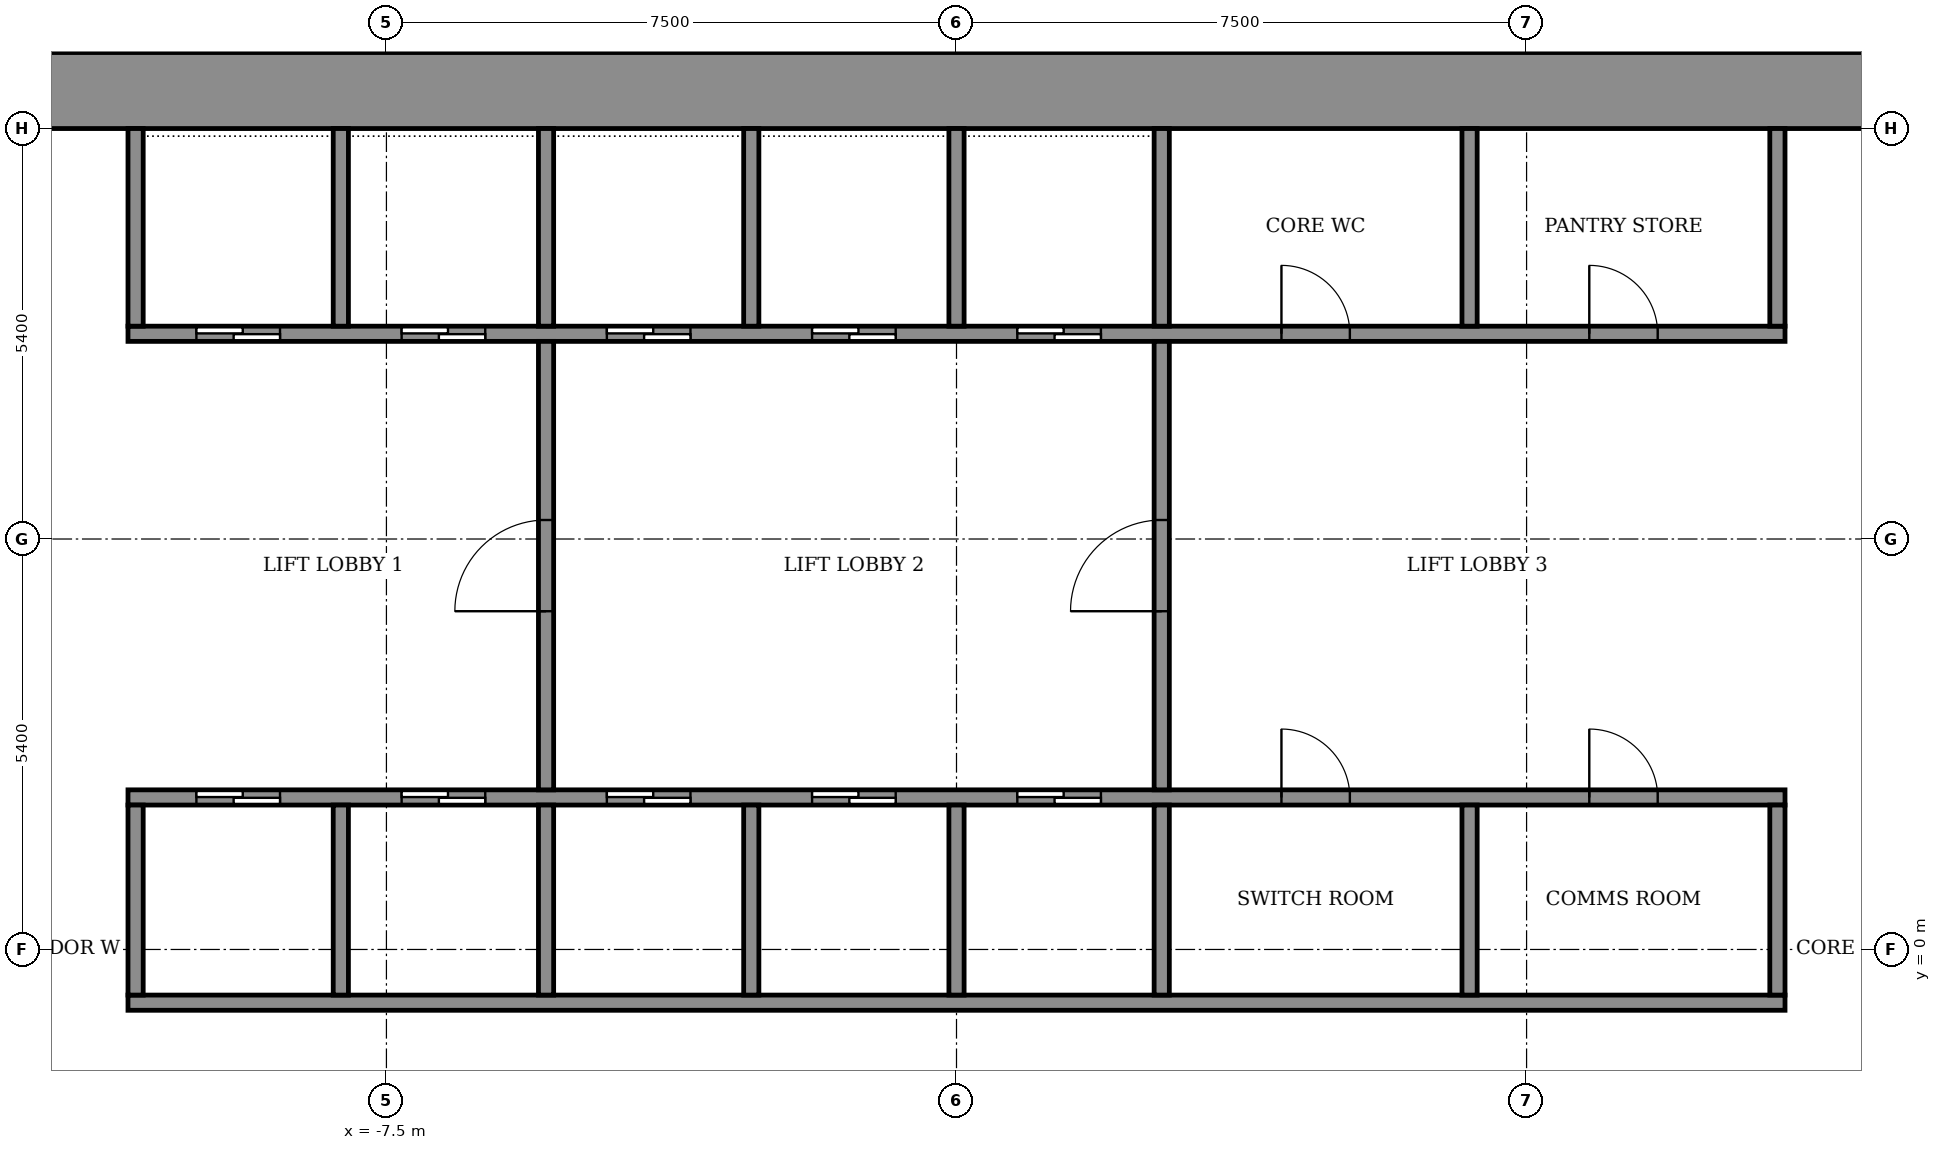
"""IFC4 building model, lengths in metres.
Left out: names, types, materials, properties, quantities, classifications, styles, units other than length and angle.
Written with IfcOpenShell. Run it as: python <this file> out.ifc"""

import sys

from ifc_helpers import new_model, si_unit, direction, frame, frame_2d, origin, place, context, subcontext, project, spatial, rectangle, extrude, element, fill, save


model = new_model("IFC4")
c1 = context("Model", 3, precision=1e-05, world=origin(), true_north=direction((0.0, 1.0)))
c2 = subcontext(c1, "Body", "Model", "MODEL_VIEW")
j1 = project(units=[si_unit("LENGTHUNIT", "METRE"), si_unit("PLANEANGLEUNIT", "RADIAN")], contexts=[c1])
p1 = place(None, origin())
s1 = spatial("IfcSite", under=j1, at=p1, CompositionType="ELEMENT")
p2 = place(p1, origin())
s2 = spatial("IfcBuilding", under=s1, at=p2, CompositionType="ELEMENT")
p3 = place(p2, frame((0.0, 0.0, 90.1)))
s3 = spatial("IfcBuildingStorey", under=s2, at=p3, CompositionType="ELEMENT", Elevation=90.1)
p4 = place(p3, frame((-14.8, 11.3, 0.0), z_axis=(0.0, 0.0, 1.0), x_axis=(1.0, 0.0, 0.0)))
e1 = element("IfcWall", 1, at=p4, inside=s3, PredefinedType="SHEAR", context=c2, shape_type="SweptSolid", body=[
    extrude(rectangle(XDim=29.6, YDim=1.0, at=frame_2d((14.8, 0.0))), origin(), (0.0, 0.0, 1.0), 3.6),
])
p5 = place(p3, frame((-10.9, -0.7, 0.0), z_axis=(0.0, 0.0, 1.0), x_axis=(1.0, 0.0, 0.0)))
e2 = element("IfcWall", 2, at=p5, inside=s3, PredefinedType="SHEAR", context=c2, shape_type="SweptSolid", body=[
    extrude(rectangle(XDim=21.8, YDim=0.2, at=frame_2d((10.9, 0.0))), origin(), (0.0, 0.0, 1.0), 3.05),
])
p6 = place(p3, frame((-10.9, 2.0, 0.0), z_axis=(0.0, 0.0, 1.0), x_axis=(1.0, 0.0, 0.0)))
e3 = element("IfcWall", 3, at=p6, inside=s3, PredefinedType="SHEAR", context=c2, shape_type="SweptSolid", body=[
    extrude(rectangle(XDim=21.8, YDim=0.2, at=frame_2d((10.9, 0.0))), origin(), (0.0, 0.0, 1.0), 3.05),
])
p7 = place(p6, frame((0.9, 0.0, 0.0)))
e4 = element("IfcOpeningElement", 4, at=p7, cuts=e3, PredefinedType="OPENING", context=c2, shape_type="SweptSolid", body=[
    extrude(rectangle(XDim=1.1, YDim=2.1, at=frame_2d((0.55, 1.05))), frame((0.0, 0.11, 0.0), z_axis=(0.0, -1.0, 0.0), x_axis=(1.0, 0.0, 0.0)), (0.0, 0.0, 1.0), 0.22),
])
p8 = place(p6, frame((3.6, 0.0, 0.0)))
e5 = element("IfcOpeningElement", 5, at=p8, cuts=e3, PredefinedType="OPENING", context=c2, shape_type="SweptSolid", body=[
    extrude(rectangle(XDim=1.1, YDim=2.1, at=frame_2d((0.55, 1.05))), frame((0.0, 0.11, 0.0), z_axis=(0.0, -1.0, 0.0), x_axis=(1.0, 0.0, 0.0)), (0.0, 0.0, 1.0), 0.22),
])
p9 = place(p6, frame((6.3, 0.0, 0.0)))
e6 = element("IfcOpeningElement", 6, at=p9, cuts=e3, PredefinedType="OPENING", context=c2, shape_type="SweptSolid", body=[
    extrude(rectangle(XDim=1.1, YDim=2.1, at=frame_2d((0.55, 1.05))), frame((0.0, 0.11, 0.0), z_axis=(0.0, -1.0, 0.0), x_axis=(1.0, 0.0, 0.0)), (0.0, 0.0, 1.0), 0.22),
])
p10 = place(p6, frame((9.0, 0.0, 0.0)))
e7 = element("IfcOpeningElement", 7, at=p10, cuts=e3, PredefinedType="OPENING", context=c2, shape_type="SweptSolid", body=[
    extrude(rectangle(XDim=1.1, YDim=2.1, at=frame_2d((0.55, 1.05))), frame((0.0, 0.11, 0.0), z_axis=(0.0, -1.0, 0.0), x_axis=(1.0, 0.0, 0.0)), (0.0, 0.0, 1.0), 0.22),
])
p11 = place(p6, frame((11.7, 0.0, 0.0)))
e8 = element("IfcOpeningElement", 8, at=p11, cuts=e3, PredefinedType="OPENING", context=c2, shape_type="SweptSolid", body=[
    extrude(rectangle(XDim=1.1, YDim=2.1, at=frame_2d((0.55, 1.05))), frame((0.0, 0.11, 0.0), z_axis=(0.0, -1.0, 0.0), x_axis=(1.0, 0.0, 0.0)), (0.0, 0.0, 1.0), 0.22),
])
p12 = place(p6, frame((15.175, 0.0, 0.0)))
e9 = element("IfcOpeningElement", 9, at=p12, cuts=e3, PredefinedType="OPENING", context=c2, shape_type="SweptSolid", body=[
    extrude(rectangle(XDim=0.9, YDim=2.1, at=frame_2d((0.45, 1.05))), frame((0.0, 0.11, 0.0), z_axis=(0.0, -1.0, 0.0), x_axis=(1.0, 0.0, 0.0)), (0.0, 0.0, 1.0), 0.22),
])
p13 = place(p6, frame((19.225, 0.0, 0.0)))
e10 = element("IfcOpeningElement", 10, at=p13, cuts=e3, PredefinedType="OPENING", context=c2, shape_type="SweptSolid", body=[
    extrude(rectangle(XDim=0.9, YDim=2.1, at=frame_2d((0.45, 1.05))), frame((0.0, 0.11, 0.0), z_axis=(0.0, -1.0, 0.0), x_axis=(1.0, 0.0, 0.0)), (0.0, 0.0, 1.0), 0.22),
])
p14 = place(p3, frame((-10.9, 8.1, 0.0), z_axis=(0.0, 0.0, 1.0), x_axis=(1.0, 0.0, 0.0)))
e11 = element("IfcWall", 11, at=p14, inside=s3, PredefinedType="SHEAR", context=c2, shape_type="SweptSolid", body=[
    extrude(rectangle(XDim=21.8, YDim=0.2, at=frame_2d((10.9, 0.0))), origin(), (0.0, 0.0, 1.0), 3.05),
])
p15 = place(p14, frame((0.9, 0.0, 0.0)))
e12 = element("IfcOpeningElement", 12, at=p15, cuts=e11, PredefinedType="OPENING", context=c2, shape_type="SweptSolid", body=[
    extrude(rectangle(XDim=1.1, YDim=2.1, at=frame_2d((0.55, 1.05))), frame((0.0, 0.11, 0.0), z_axis=(0.0, -1.0, 0.0), x_axis=(1.0, 0.0, 0.0)), (0.0, 0.0, 1.0), 0.22),
])
p16 = place(p14, frame((3.6, 0.0, 0.0)))
e13 = element("IfcOpeningElement", 13, at=p16, cuts=e11, PredefinedType="OPENING", context=c2, shape_type="SweptSolid", body=[
    extrude(rectangle(XDim=1.1, YDim=2.1, at=frame_2d((0.55, 1.05))), frame((0.0, 0.11, 0.0), z_axis=(0.0, -1.0, 0.0), x_axis=(1.0, 0.0, 0.0)), (0.0, 0.0, 1.0), 0.22),
])
p17 = place(p14, frame((6.3, 0.0, 0.0)))
e14 = element("IfcOpeningElement", 14, at=p17, cuts=e11, PredefinedType="OPENING", context=c2, shape_type="SweptSolid", body=[
    extrude(rectangle(XDim=1.1, YDim=2.1, at=frame_2d((0.55, 1.05))), frame((0.0, 0.11, 0.0), z_axis=(0.0, -1.0, 0.0), x_axis=(1.0, 0.0, 0.0)), (0.0, 0.0, 1.0), 0.22),
])
p18 = place(p14, frame((9.0, 0.0, 0.0)))
e15 = element("IfcOpeningElement", 15, at=p18, cuts=e11, PredefinedType="OPENING", context=c2, shape_type="SweptSolid", body=[
    extrude(rectangle(XDim=1.1, YDim=2.1, at=frame_2d((0.55, 1.05))), frame((0.0, 0.11, 0.0), z_axis=(0.0, -1.0, 0.0), x_axis=(1.0, 0.0, 0.0)), (0.0, 0.0, 1.0), 0.22),
])
p19 = place(p14, frame((11.7, 0.0, 0.0)))
e16 = element("IfcOpeningElement", 16, at=p19, cuts=e11, PredefinedType="OPENING", context=c2, shape_type="SweptSolid", body=[
    extrude(rectangle(XDim=1.1, YDim=2.1, at=frame_2d((0.55, 1.05))), frame((0.0, 0.11, 0.0), z_axis=(0.0, -1.0, 0.0), x_axis=(1.0, 0.0, 0.0)), (0.0, 0.0, 1.0), 0.22),
])
p20 = place(p14, frame((15.175, 0.0, 0.0)))
e17 = element("IfcOpeningElement", 17, at=p20, cuts=e11, PredefinedType="OPENING", context=c2, shape_type="SweptSolid", body=[
    extrude(rectangle(XDim=0.9, YDim=2.1, at=frame_2d((0.45, 1.05))), frame((0.0, 0.11, 0.0), z_axis=(0.0, -1.0, 0.0), x_axis=(1.0, 0.0, 0.0)), (0.0, 0.0, 1.0), 0.22),
])
p21 = place(p14, frame((19.225, 0.0, 0.0)))
e18 = element("IfcOpeningElement", 18, at=p21, cuts=e11, PredefinedType="OPENING", context=c2, shape_type="SweptSolid", body=[
    extrude(rectangle(XDim=0.9, YDim=2.1, at=frame_2d((0.45, 1.05))), frame((0.0, 0.11, 0.0), z_axis=(0.0, -1.0, 0.0), x_axis=(1.0, 0.0, 0.0)), (0.0, 0.0, 1.0), 0.22),
])
for number, where, z_axis, x_axis in (
    (19, (-10.8, -0.6, 0.0), (0.0, 0.0, 1.0), (0.0, 1.0, 0.0)),
    (20, (-8.1, -0.6, 0.0), (0.0, 0.0, 1.0), (0.0, 1.0, 0.0)),
    (21, (-5.4, -0.6, 0.0), (0.0, 0.0, 1.0), (0.0, 1.0, 0.0)),
    (22, (-2.7, -0.6, 0.0), (0.0, 0.0, 1.0), (0.0, 1.0, 0.0)),
    (23, (0.0, -0.6, 0.0), (0.0, 0.0, 1.0), (0.0, 1.0, 0.0)),
    (24, (2.7, -0.6, 0.0), (0.0, 0.0, 1.0), (0.0, 1.0, 0.0)),
):
    element("IfcWall", number, at=place(p3, frame(where, z_axis=z_axis, x_axis=x_axis)), inside=s3, PredefinedType="SHEAR", context=c2, shape_type="SweptSolid", body=[
        extrude(rectangle(XDim=2.5, YDim=0.2, at=frame_2d((1.25, 0.0))), origin(), (0.0, 0.0, 1.0), 3.05),
    ])
for number, where, z_axis, x_axis in (
    (25, (6.75, -0.6, 0.0), (0.0, 0.0, 1.0), (0.0, 1.0, 0.0)),
    (26, (10.8, -0.6, 0.0), (0.0, 0.0, 1.0), (0.0, 1.0, 0.0)),
):
    element("IfcWall", number, at=place(p3, frame(where, z_axis=z_axis, x_axis=x_axis)), inside=s3, PredefinedType="STANDARD", context=c2, shape_type="SweptSolid", body=[
        extrude(rectangle(XDim=2.5, YDim=0.2, at=frame_2d((1.25, 0.0))), origin(), (0.0, 0.0, 1.0), 3.05),
    ])
for number, where, z_axis, x_axis in (
    (27, (-10.8, 8.2, 0.0), (0.0, 0.0, 1.0), (0.0, 1.0, 0.0)),
    (28, (-8.1, 8.2, 0.0), (0.0, 0.0, 1.0), (0.0, 1.0, 0.0)),
    (29, (-5.4, 8.2, 0.0), (0.0, 0.0, 1.0), (0.0, 1.0, 0.0)),
    (30, (-2.7, 8.2, 0.0), (0.0, 0.0, 1.0), (0.0, 1.0, 0.0)),
    (31, (0.0, 8.2, 0.0), (0.0, 0.0, 1.0), (0.0, 1.0, 0.0)),
    (32, (2.7, 8.2, 0.0), (0.0, 0.0, 1.0), (0.0, 1.0, 0.0)),
):
    element("IfcWall", number, at=place(p3, frame(where, z_axis=z_axis, x_axis=x_axis)), inside=s3, PredefinedType="SHEAR", context=c2, shape_type="SweptSolid", body=[
        extrude(rectangle(XDim=2.6, YDim=0.2, at=frame_2d((1.3, 0.0))), origin(), (0.0, 0.0, 1.0), 3.05),
    ])
for number, where, z_axis, x_axis in (
    (33, (6.75, 8.2, 0.0), (0.0, 0.0, 1.0), (0.0, 1.0, 0.0)),
    (34, (10.8, 8.2, 0.0), (0.0, 0.0, 1.0), (0.0, 1.0, 0.0)),
):
    element("IfcWall", number, at=place(p3, frame(where, z_axis=z_axis, x_axis=x_axis)), inside=s3, PredefinedType="STANDARD", context=c2, shape_type="SweptSolid", body=[
        extrude(rectangle(XDim=2.6, YDim=0.2, at=frame_2d((1.3, 0.0))), origin(), (0.0, 0.0, 1.0), 3.05),
    ])
p22 = place(p3, frame((-5.4, 2.1, 0.0), z_axis=(0.0, 0.0, 1.0), x_axis=(0.0, 1.0, 0.0)))
e35 = element("IfcWall", 35, at=p22, inside=s3, PredefinedType="STANDARD", context=c2, shape_type="SweptSolid", body=[
    extrude(rectangle(XDim=5.9, YDim=0.2, at=frame_2d((2.95, 0.0))), origin(), (0.0, 0.0, 1.0), 3.05),
])
p23 = place(p22, frame((2.35, 0.0, 0.0)))
e36 = element("IfcOpeningElement", 36, at=p23, cuts=e35, PredefinedType="OPENING", context=c2, shape_type="SweptSolid", body=[
    extrude(rectangle(XDim=1.2, YDim=2.1, at=frame_2d((0.6, 1.05))), frame((0.0, 0.11, 0.0), z_axis=(0.0, -1.0, 0.0), x_axis=(1.0, 0.0, 0.0)), (0.0, 0.0, 1.0), 0.22),
])
p24 = place(p3, frame((2.7, 2.1, 0.0), z_axis=(0.0, 0.0, 1.0), x_axis=(0.0, 1.0, 0.0)))
e37 = element("IfcWall", 37, at=p24, inside=s3, PredefinedType="STANDARD", context=c2, shape_type="SweptSolid", body=[
    extrude(rectangle(XDim=5.9, YDim=0.2, at=frame_2d((2.95, 0.0))), origin(), (0.0, 0.0, 1.0), 3.05),
])
p25 = place(p24, frame((2.35, 0.0, 0.0)))
e38 = element("IfcOpeningElement", 38, at=p25, cuts=e37, PredefinedType="OPENING", context=c2, shape_type="SweptSolid", body=[
    extrude(rectangle(XDim=1.2, YDim=2.1, at=frame_2d((0.6, 1.05))), frame((0.0, 0.11, 0.0), z_axis=(0.0, -1.0, 0.0), x_axis=(1.0, 0.0, 0.0)), (0.0, 0.0, 1.0), 0.22),
])
p26 = place(p7, origin())
e39 = element("IfcDoor", 39, at=p26, inside=s3, OperationType="SLIDING_TO_LEFT", PredefinedType="DOOR", context=c2, shape_type="SweptSolid", body=[
    extrude(rectangle(XDim=1.1, YDim=2.1, at=frame_2d((0.55, 1.05))), frame((0.0, 0.025, 0.0), z_axis=(0.0, -1.0, 0.0), x_axis=(1.0, 0.0, 0.0)), (0.0, 0.0, 1.0), 0.05),
])
fill(e4, e39)
p27 = place(p8, origin())
e40 = element("IfcDoor", 40, at=p27, inside=s3, OperationType="SLIDING_TO_LEFT", PredefinedType="DOOR", context=c2, shape_type="SweptSolid", body=[
    extrude(rectangle(XDim=1.1, YDim=2.1, at=frame_2d((0.55, 1.05))), frame((0.0, 0.025, 0.0), z_axis=(0.0, -1.0, 0.0), x_axis=(1.0, 0.0, 0.0)), (0.0, 0.0, 1.0), 0.05),
])
fill(e5, e40)
p28 = place(p9, origin())
e41 = element("IfcDoor", 41, at=p28, inside=s3, OperationType="SLIDING_TO_LEFT", PredefinedType="DOOR", context=c2, shape_type="SweptSolid", body=[
    extrude(rectangle(XDim=1.1, YDim=2.1, at=frame_2d((0.55, 1.05))), frame((0.0, 0.025, 0.0), z_axis=(0.0, -1.0, 0.0), x_axis=(1.0, 0.0, 0.0)), (0.0, 0.0, 1.0), 0.05),
])
fill(e6, e41)
p29 = place(p10, origin())
e42 = element("IfcDoor", 42, at=p29, inside=s3, OperationType="SLIDING_TO_LEFT", PredefinedType="DOOR", context=c2, shape_type="SweptSolid", body=[
    extrude(rectangle(XDim=1.1, YDim=2.1, at=frame_2d((0.55, 1.05))), frame((0.0, 0.025, 0.0), z_axis=(0.0, -1.0, 0.0), x_axis=(1.0, 0.0, 0.0)), (0.0, 0.0, 1.0), 0.05),
])
fill(e7, e42)
p30 = place(p11, origin())
e43 = element("IfcDoor", 43, at=p30, inside=s3, OperationType="SLIDING_TO_LEFT", PredefinedType="DOOR", context=c2, shape_type="SweptSolid", body=[
    extrude(rectangle(XDim=1.1, YDim=2.1, at=frame_2d((0.55, 1.05))), frame((0.0, 0.025, 0.0), z_axis=(0.0, -1.0, 0.0), x_axis=(1.0, 0.0, 0.0)), (0.0, 0.0, 1.0), 0.05),
])
fill(e8, e43)
p31 = place(p15, origin())
e44 = element("IfcDoor", 44, at=p31, inside=s3, OperationType="SLIDING_TO_LEFT", PredefinedType="DOOR", context=c2, shape_type="SweptSolid", body=[
    extrude(rectangle(XDim=1.1, YDim=2.1, at=frame_2d((0.55, 1.05))), frame((0.0, 0.025, 0.0), z_axis=(0.0, -1.0, 0.0), x_axis=(1.0, 0.0, 0.0)), (0.0, 0.0, 1.0), 0.05),
])
fill(e12, e44)
p32 = place(p16, origin())
e45 = element("IfcDoor", 45, at=p32, inside=s3, OperationType="SLIDING_TO_LEFT", PredefinedType="DOOR", context=c2, shape_type="SweptSolid", body=[
    extrude(rectangle(XDim=1.1, YDim=2.1, at=frame_2d((0.55, 1.05))), frame((0.0, 0.025, 0.0), z_axis=(0.0, -1.0, 0.0), x_axis=(1.0, 0.0, 0.0)), (0.0, 0.0, 1.0), 0.05),
])
fill(e13, e45)
p33 = place(p17, origin())
e46 = element("IfcDoor", 46, at=p33, inside=s3, OperationType="SLIDING_TO_LEFT", PredefinedType="DOOR", context=c2, shape_type="SweptSolid", body=[
    extrude(rectangle(XDim=1.1, YDim=2.1, at=frame_2d((0.55, 1.05))), frame((0.0, 0.025, 0.0), z_axis=(0.0, -1.0, 0.0), x_axis=(1.0, 0.0, 0.0)), (0.0, 0.0, 1.0), 0.05),
])
fill(e14, e46)
p34 = place(p18, origin())
e47 = element("IfcDoor", 47, at=p34, inside=s3, OperationType="SLIDING_TO_LEFT", PredefinedType="DOOR", context=c2, shape_type="SweptSolid", body=[
    extrude(rectangle(XDim=1.1, YDim=2.1, at=frame_2d((0.55, 1.05))), frame((0.0, 0.025, 0.0), z_axis=(0.0, -1.0, 0.0), x_axis=(1.0, 0.0, 0.0)), (0.0, 0.0, 1.0), 0.05),
])
fill(e15, e47)
p35 = place(p19, origin())
e48 = element("IfcDoor", 48, at=p35, inside=s3, OperationType="SLIDING_TO_LEFT", PredefinedType="DOOR", context=c2, shape_type="SweptSolid", body=[
    extrude(rectangle(XDim=1.1, YDim=2.1, at=frame_2d((0.55, 1.05))), frame((0.0, 0.025, 0.0), z_axis=(0.0, -1.0, 0.0), x_axis=(1.0, 0.0, 0.0)), (0.0, 0.0, 1.0), 0.05),
])
fill(e16, e48)
p36 = place(p12, origin())
e49 = element("IfcDoor", 49, at=p36, inside=s3, OperationType="SINGLE_SWING_LEFT", PredefinedType="DOOR", context=c2, shape_type="SweptSolid", body=[
    extrude(rectangle(XDim=0.9, YDim=2.1, at=frame_2d((0.45, 1.05))), frame((0.0, 0.025, 0.0), z_axis=(0.0, -1.0, 0.0), x_axis=(1.0, 0.0, 0.0)), (0.0, 0.0, 1.0), 0.05),
])
fill(e9, e49)
p37 = place(p13, origin())
e50 = element("IfcDoor", 50, at=p37, inside=s3, OperationType="SINGLE_SWING_LEFT", PredefinedType="DOOR", context=c2, shape_type="SweptSolid", body=[
    extrude(rectangle(XDim=0.9, YDim=2.1, at=frame_2d((0.45, 1.05))), frame((0.0, 0.025, 0.0), z_axis=(0.0, -1.0, 0.0), x_axis=(1.0, 0.0, 0.0)), (0.0, 0.0, 1.0), 0.05),
])
fill(e10, e50)
p38 = place(p20, origin())
e51 = element("IfcDoor", 51, at=p38, inside=s3, OperationType="SINGLE_SWING_RIGHT", PredefinedType="DOOR", context=c2, shape_type="SweptSolid", body=[
    extrude(rectangle(XDim=0.9, YDim=2.1, at=frame_2d((0.45, 1.05))), frame((0.0, 0.025, 0.0), z_axis=(0.0, -1.0, 0.0), x_axis=(1.0, 0.0, 0.0)), (0.0, 0.0, 1.0), 0.05),
])
fill(e17, e51)
p39 = place(p21, origin())
e52 = element("IfcDoor", 52, at=p39, inside=s3, OperationType="SINGLE_SWING_RIGHT", PredefinedType="DOOR", context=c2, shape_type="SweptSolid", body=[
    extrude(rectangle(XDim=0.9, YDim=2.1, at=frame_2d((0.45, 1.05))), frame((0.0, 0.025, 0.0), z_axis=(0.0, -1.0, 0.0), x_axis=(1.0, 0.0, 0.0)), (0.0, 0.0, 1.0), 0.05),
])
fill(e18, e52)
p40 = place(p23, origin())
e53 = element("IfcDoor", 53, at=p40, inside=s3, OperationType="SINGLE_SWING_LEFT", PredefinedType="DOOR", context=c2, shape_type="SweptSolid", body=[
    extrude(rectangle(XDim=1.2, YDim=2.1, at=frame_2d((0.6, 1.05))), frame((0.0, 0.025, 0.0), z_axis=(0.0, -1.0, 0.0), x_axis=(1.0, 0.0, 0.0)), (0.0, 0.0, 1.0), 0.05),
])
fill(e36, e53)
p41 = place(p25, origin())
e54 = element("IfcDoor", 54, at=p41, inside=s3, OperationType="SINGLE_SWING_LEFT", PredefinedType="DOOR", context=c2, shape_type="SweptSolid", body=[
    extrude(rectangle(XDim=1.2, YDim=2.1, at=frame_2d((0.6, 1.05))), frame((0.0, 0.025, 0.0), z_axis=(0.0, -1.0, 0.0), x_axis=(1.0, 0.0, 0.0)), (0.0, 0.0, 1.0), 0.05),
])
fill(e38, e54)
save(model, sys.argv[1])
